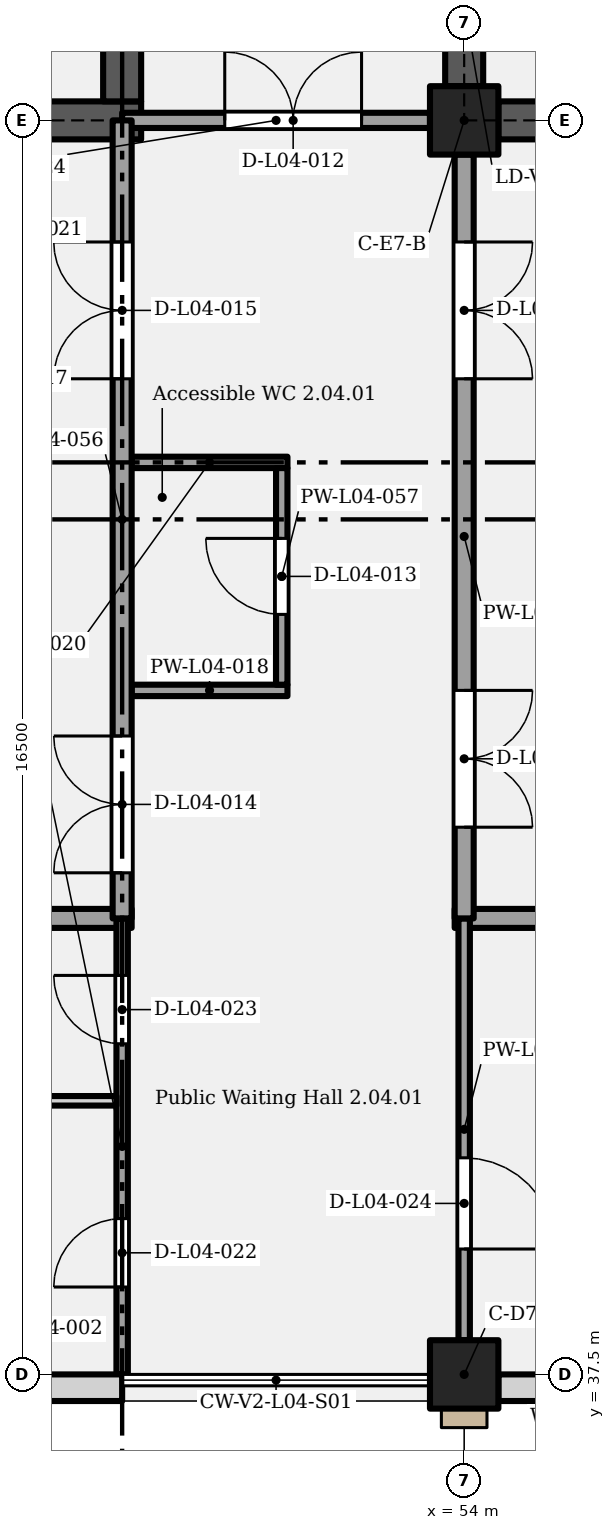
"""IFC4 building model, lengths in metres.
Left out: names, types, materials, properties, quantities, classifications, styles, units other than length and angle.
Written with IfcOpenShell. Run it as: python <this file> out.ifc"""

import sys

from ifc_helpers import new_model, si_unit, direction, frame, frame_2d, origin, origin_2d, place, context, subcontext, project, spatial, rectangle, extrude, element, fill, save


model = new_model("IFC4")
c1 = context("Model", 3, precision=1e-05, world=origin(), true_north=direction((0.0, 1.0)))
c2 = subcontext(c1, "Body", "Model", "MODEL_VIEW")
j1 = project(units=[si_unit("LENGTHUNIT", "METRE"), si_unit("PLANEANGLEUNIT", "RADIAN")], contexts=[c1])
p1 = place(None, origin())
s1 = spatial("IfcSite", under=j1, at=p1, CompositionType="ELEMENT")
p2 = place(p1, origin())
s2 = spatial("IfcBuilding", under=s1, at=p2, CompositionType="ELEMENT")
p3 = place(p2, frame((0.0, 0.0, 22.8)))
s3 = spatial("IfcBuildingStorey", under=s2, at=p3, CompositionType="ELEMENT", Elevation=22.8)
for number, where, z_axis, x_axis in (
    (1, (54.0, 37.5, 0.0), (0.0, 0.0, 1.0), (1.0, 0.0, 0.0)),
    (2, (54.0, 54.0, 0.0), (0.0, 0.0, 1.0), (1.0, 0.0, 0.0)),
):
    element("IfcColumn", number, at=place(p3, frame(where, z_axis=z_axis, x_axis=x_axis)), inside=s3, PredefinedType="COLUMN", context=c2, shape_type="SweptSolid", body=[
        extrude(rectangle(XDim=0.9, YDim=0.9, at=origin_2d()), origin(), (0.0, 0.0, 1.0), 5.4),
    ])
p4 = place(p3, frame((46.25, 54.0, 0.0), z_axis=(0.0, 0.0, 1.0), x_axis=(1.0, 0.0, 0.0)))
e3 = element("IfcWall", 3, at=p4, inside=s3, PredefinedType="SHEAR", context=c2, shape_type="SweptSolid", body=[
    extrude(rectangle(XDim=3.5, YDim=0.5, at=frame_2d((1.75, 0.0))), origin(), (0.0, 0.0, 1.0), 5.15),
])
p5 = place(p3, frame((54.45, 54.0, 0.0), z_axis=(0.0, 0.0, 1.0), x_axis=(1.0, 0.0, 0.0)))
e4 = element("IfcWall", 4, at=p5, inside=s3, PredefinedType="SHEAR", context=c2, shape_type="SweptSolid", body=[
    extrude(rectangle(XDim=2.8, YDim=0.5, at=frame_2d((1.4, 0.0))), origin(), (0.0, 0.0, 1.0), 5.15),
])
p6 = place(p3, frame((49.5, 54.25, 0.0), z_axis=(0.0, 0.0, 1.0), x_axis=(0.0, 1.0, 0.0)))
e5 = element("IfcWall", 5, at=p6, inside=s3, PredefinedType="SHEAR", context=c2, shape_type="SweptSolid", body=[
    extrude(rectangle(XDim=11.5, YDim=0.5, at=frame_2d((5.75, 0.0))), origin(), (0.0, 0.0, 1.0), 5.15),
])
p7 = place(p6, frame((0.7, 0.0, 0.0)))
e6 = element("IfcOpeningElement", 6, at=p7, cuts=e5, PredefinedType="OPENING", context=c2, shape_type="SweptSolid", body=[
    extrude(rectangle(XDim=1.1, YDim=2.1, at=frame_2d((0.55, 1.05))), frame((0.0, 0.26, 0.0), z_axis=(0.0, -1.0, 0.0), x_axis=(1.0, 0.0, 0.0)), (0.0, 0.0, 1.0), 0.52),
])
p8 = place(p6, frame((4.35, 0.0, 0.0), z_axis=(0.0, 0.0, 1.0), x_axis=(-1.0, 0.0, 0.0)))
e7 = element("IfcOpeningElement", 7, at=p8, cuts=e5, PredefinedType="OPENING", context=c2, shape_type="SweptSolid", body=[
    extrude(rectangle(XDim=1.2, YDim=2.1, at=frame_2d((0.6, 1.05))), frame((0.0, 0.26, 0.0), z_axis=(0.0, -1.0, 0.0), x_axis=(1.0, 0.0, 0.0)), (0.0, 0.0, 1.0), 0.52),
])
p9 = place(p3, frame((54.0, 54.45, 0.0), z_axis=(0.0, 0.0, 1.0), x_axis=(0.0, 1.0, 0.0)))
e8 = element("IfcWall", 8, at=p9, inside=s3, PredefinedType="SHEAR", context=c2, shape_type="SweptSolid", body=[
    extrude(rectangle(XDim=11.1, YDim=0.5, at=frame_2d((5.55, 0.0))), origin(), (0.0, 0.0, 1.0), 5.15),
])
p10 = place(p9, frame((0.5, 0.0, 0.0)))
e9 = element("IfcOpeningElement", 9, at=p10, cuts=e8, PredefinedType="OPENING", context=c2, shape_type="SweptSolid", body=[
    extrude(rectangle(XDim=1.1, YDim=2.1, at=frame_2d((0.55, 1.05))), frame((0.0, 0.26, 0.0), z_axis=(0.0, -1.0, 0.0), x_axis=(1.0, 0.0, 0.0)), (0.0, 0.0, 1.0), 0.52),
])
p11 = place(p9, frame((2.95, 0.0, 0.0)))
e10 = element("IfcOpeningElement", 10, at=p11, cuts=e8, PredefinedType="OPENING", context=c2, shape_type="SweptSolid", body=[
    extrude(rectangle(XDim=1.2, YDim=2.1, at=frame_2d((0.6, 1.05))), frame((0.0, 0.26, 0.0), z_axis=(0.0, -1.0, 0.0), x_axis=(1.0, 0.0, 0.0)), (0.0, 0.0, 1.0), 0.52),
])
p12 = place(p3, frame((45.45, 37.325, 0.0), z_axis=(0.0, 0.0, 1.0), x_axis=(1.0, 0.0, 0.0)))
e11 = element("IfcWall", 11, at=p12, inside=s3, PredefinedType="SOLIDWALL", context=c2, shape_type="SweptSolid", body=[
    extrude(rectangle(XDim=4.05, YDim=0.35, at=frame_2d((2.025, 0.0))), origin(), (0.0, 0.0, 1.0), 5.15),
])
p13 = place(p12, frame((1.05, 0.0, 1.05)))
e12 = element("IfcOpeningElement", 12, at=p13, cuts=e11, PredefinedType="OPENING", context=c2, shape_type="SweptSolid", body=[
    extrude(rectangle(XDim=1.5, YDim=3.5, at=frame_2d((0.75, 1.75))), frame((0.0, 0.185, 0.0), z_axis=(0.0, -1.0, 0.0), x_axis=(1.0, 0.0, 0.0)), (0.0, 0.0, 1.0), 0.37),
])
p14 = place(p3, frame((54.45, 37.325, 0.0), z_axis=(0.0, 0.0, 1.0), x_axis=(1.0, 0.0, 0.0)))
e13 = element("IfcWall", 13, at=p14, inside=s3, PredefinedType="SOLIDWALL", context=c2, shape_type="SweptSolid", body=[
    extrude(rectangle(XDim=8.1, YDim=0.35, at=frame_2d((4.05, 0.0))), origin(), (0.0, 0.0, 1.0), 5.15),
])
p15 = place(p14, frame((0.525, 0.0, 1.05)))
e14 = element("IfcOpeningElement", 14, at=p15, cuts=e13, PredefinedType="OPENING", context=c2, shape_type="SweptSolid", body=[
    extrude(rectangle(XDim=1.05, YDim=2.4, at=frame_2d((0.525, 1.2))), frame((0.0, 0.185, 0.0), z_axis=(0.0, -1.0, 0.0), x_axis=(1.0, 0.0, 0.0)), (0.0, 0.0, 1.0), 0.37),
])
p16 = place(p14, frame((3.525, 0.0, 1.05)))
e15 = element("IfcOpeningElement", 15, at=p16, cuts=e13, PredefinedType="OPENING", context=c2, shape_type="SweptSolid", body=[
    extrude(rectangle(XDim=1.05, YDim=2.4, at=frame_2d((0.525, 1.2))), frame((0.0, 0.185, 0.0), z_axis=(0.0, -1.0, 0.0), x_axis=(1.0, 0.0, 0.0)), (0.0, 0.0, 1.0), 0.37),
])
p17 = place(p14, frame((6.525, 0.0, 1.05)))
e16 = element("IfcOpeningElement", 16, at=p17, cuts=e13, PredefinedType="OPENING", context=c2, shape_type="SweptSolid", body=[
    extrude(rectangle(XDim=1.05, YDim=2.4, at=frame_2d((0.525, 1.2))), frame((0.0, 0.185, 0.0), z_axis=(0.0, -1.0, 0.0), x_axis=(1.0, 0.0, 0.0)), (0.0, 0.0, 1.0), 0.37),
])
p18 = place(p3, frame((45.15, 41.1, 0.0), z_axis=(0.0, 0.0, 1.0), x_axis=(1.0, 0.0, 0.0)))
e17 = element("IfcWall", 17, at=p18, inside=s3, PredefinedType="PARTITIONING", context=c2, shape_type="SweptSolid", body=[
    extrude(rectangle(XDim=4.275, YDim=0.125, at=frame_2d((2.138, 0.0))), origin(), (0.0, 0.0, 1.0), 5.15),
])
p19 = place(p3, frame((45.0, 43.5, 0.0), z_axis=(0.0, 0.0, 1.0), x_axis=(1.0, 0.0, 0.0)))
e18 = element("IfcWall", 18, at=p19, inside=s3, PredefinedType="PARTITIONING", context=c2, shape_type="SweptSolid", body=[
    extrude(rectangle(XDim=4.625, YDim=0.25, at=frame_2d((2.312, 0.0))), origin(), (0.0, 0.0, 1.0), 5.15),
])
p20 = place(p3, frame((53.875, 43.5, 0.0), z_axis=(0.0, 0.0, 1.0), x_axis=(1.0, 0.0, 0.0)))
e19 = element("IfcWall", 19, at=p20, inside=s3, PredefinedType="PARTITIONING", context=c2, shape_type="SweptSolid", body=[
    extrude(rectangle(XDim=9.125, YDim=0.25, at=frame_2d((4.562, 0.0))), origin(), (0.0, 0.0, 1.0), 5.15),
])
for number, where, z_axis, x_axis in (
    (20, (49.625, 46.5, 0.0), (0.0, 0.0, 1.0), (1.0, 0.0, 0.0)),
    (21, (49.625, 49.5, 0.0), (0.0, 0.0, 1.0), (1.0, 0.0, 0.0)),
):
    element("IfcWall", number, at=place(p3, frame(where, z_axis=z_axis, x_axis=x_axis)), inside=s3, PredefinedType="PARTITIONING", context=c2, shape_type="SweptSolid", body=[
        extrude(rectangle(XDim=2.05, YDim=0.15, at=frame_2d((1.025, 0.0))), origin(), (0.0, 0.0, 1.0), 5.15),
    ])
p21 = place(p3, frame((49.5, 54.0, 0.0), z_axis=(0.0, 0.0, 1.0), x_axis=(1.0, 0.0, 0.0)))
e22 = element("IfcWall", 22, at=p21, inside=s3, PredefinedType="PARTITIONING", context=c2, shape_type="SweptSolid", body=[
    extrude(rectangle(XDim=4.05, YDim=0.2, at=frame_2d((2.025, 0.0))), origin(), (0.0, 0.0, 1.0), 4.4),
])
p22 = place(p21, frame((1.35, 0.0, 0.0)))
e23 = element("IfcOpeningElement", 23, at=p22, cuts=e22, PredefinedType="OPENING", context=c2, shape_type="SweptSolid", body=[
    extrude(rectangle(XDim=1.8, YDim=2.1, at=frame_2d((0.9, 1.05))), frame((0.0, 0.11, 0.0), z_axis=(0.0, -1.0, 0.0), x_axis=(1.0, 0.0, 0.0)), (0.0, 0.0, 1.0), 0.22),
])
p23 = place(p3, frame((49.5, 37.5, 0.0), z_axis=(0.0, 0.0, 1.0), x_axis=(0.0, 1.0, 0.0)))
e24 = element("IfcWall", 24, at=p23, inside=s3, PredefinedType="PARTITIONING", context=c2, shape_type="SweptSolid", body=[
    extrude(rectangle(XDim=6.0, YDim=0.15, at=frame_2d((3.0, 0.0))), origin(), (0.0, 0.0, 1.0), 5.15),
])
p24 = place(p23, frame((1.15, 0.0, 0.0)))
e25 = element("IfcOpeningElement", 25, at=p24, cuts=e24, PredefinedType="OPENING", context=c2, shape_type="SweptSolid", body=[
    extrude(rectangle(XDim=0.9, YDim=2.1, at=frame_2d((0.45, 1.05))), frame((0.0, 0.085, 0.0), z_axis=(0.0, -1.0, 0.0), x_axis=(1.0, 0.0, 0.0)), (0.0, 0.0, 1.0), 0.17),
])
p25 = place(p23, frame((4.35, 0.0, 0.0)))
e26 = element("IfcOpeningElement", 26, at=p25, cuts=e24, PredefinedType="OPENING", context=c2, shape_type="SweptSolid", body=[
    extrude(rectangle(XDim=0.9, YDim=2.1, at=frame_2d((0.45, 1.05))), frame((0.0, 0.085, 0.0), z_axis=(0.0, -1.0, 0.0), x_axis=(1.0, 0.0, 0.0)), (0.0, 0.0, 1.0), 0.17),
])
p26 = place(p3, frame((49.5, 43.5, 0.0), z_axis=(0.0, 0.0, 1.0), x_axis=(0.0, 1.0, 0.0)))
e27 = element("IfcWall", 27, at=p26, inside=s3, PredefinedType="PARTITIONING", context=c2, shape_type="SweptSolid", body=[
    extrude(rectangle(XDim=10.5, YDim=0.25, at=frame_2d((5.25, 0.0))), origin(), (0.0, 0.0, 1.0), 5.15),
])
p27 = place(p26, frame((0.6, 0.0, 0.0)))
e28 = element("IfcOpeningElement", 28, at=p27, cuts=e27, PredefinedType="OPENING", context=c2, shape_type="SweptSolid", body=[
    extrude(rectangle(XDim=1.8, YDim=2.4, at=frame_2d((0.9, 1.2))), frame((0.0, 0.135, 0.0), z_axis=(0.0, -1.0, 0.0), x_axis=(1.0, 0.0, 0.0)), (0.0, 0.0, 1.0), 0.27),
])
p28 = place(p26, frame((7.1, 0.0, 0.0)))
e29 = element("IfcOpeningElement", 29, at=p28, cuts=e27, PredefinedType="OPENING", context=c2, shape_type="SweptSolid", body=[
    extrude(rectangle(XDim=1.8, YDim=2.4, at=frame_2d((0.9, 1.2))), frame((0.0, 0.135, 0.0), z_axis=(0.0, -1.0, 0.0), x_axis=(1.0, 0.0, 0.0)), (0.0, 0.0, 1.0), 0.27),
])
p29 = place(p3, frame((51.6, 46.575, 0.0), z_axis=(0.0, 0.0, 1.0), x_axis=(0.0, 1.0, 0.0)))
e30 = element("IfcWall", 30, at=p29, inside=s3, PredefinedType="PARTITIONING", context=c2, shape_type="SweptSolid", body=[
    extrude(rectangle(XDim=2.85, YDim=0.15, at=frame_2d((1.425, 0.0))), origin(), (0.0, 0.0, 1.0), 5.15),
])
p30 = place(p29, frame((0.925, 0.0, 0.0)))
e31 = element("IfcOpeningElement", 31, at=p30, cuts=e30, PredefinedType="OPENING", context=c2, shape_type="SweptSolid", body=[
    extrude(rectangle(XDim=1.0, YDim=2.1, at=frame_2d((0.5, 1.05))), frame((0.0, 0.085, 0.0), z_axis=(0.0, -1.0, 0.0), x_axis=(1.0, 0.0, 0.0)), (0.0, 0.0, 1.0), 0.17),
])
p31 = place(p3, frame((54.0, 37.95, 0.0), z_axis=(0.0, 0.0, 1.0), x_axis=(0.0, 1.0, 0.0)))
e32 = element("IfcWall", 32, at=p31, inside=s3, PredefinedType="PARTITIONING", context=c2, shape_type="SweptSolid", body=[
    extrude(rectangle(XDim=5.55, YDim=0.15, at=frame_2d((2.775, 0.0))), origin(), (0.0, 0.0, 1.0), 4.2),
])
p32 = place(p31, frame((2.4, 0.0, 0.0), z_axis=(0.0, 0.0, 1.0), x_axis=(-1.0, 0.0, 0.0)))
e33 = element("IfcOpeningElement", 33, at=p32, cuts=e32, PredefinedType="OPENING", context=c2, shape_type="SweptSolid", body=[
    extrude(rectangle(XDim=1.2, YDim=2.1, at=frame_2d((0.6, 1.05))), frame((0.0, 0.085, 0.0), z_axis=(0.0, -1.0, 0.0), x_axis=(1.0, 0.0, 0.0)), (0.0, 0.0, 1.0), 0.17),
])
p33 = place(p3, frame((54.0, 43.5, 0.0), z_axis=(0.0, 0.0, 1.0), x_axis=(0.0, 1.0, 0.0)))
e34 = element("IfcWall", 34, at=p33, inside=s3, PredefinedType="PARTITIONING", context=c2, shape_type="SweptSolid", body=[
    extrude(rectangle(XDim=10.05, YDim=0.25, at=frame_2d((5.025, 0.0))), origin(), (0.0, 0.0, 1.0), 4.2),
])
p34 = place(p33, frame((3.0, 0.0, 0.0), z_axis=(0.0, 0.0, 1.0), x_axis=(-1.0, 0.0, 0.0)))
e35 = element("IfcOpeningElement", 35, at=p34, cuts=e34, PredefinedType="OPENING", context=c2, shape_type="SweptSolid", body=[
    extrude(rectangle(XDim=1.8, YDim=2.4, at=frame_2d((0.9, 1.2))), frame((0.0, 0.135, 0.0), z_axis=(0.0, -1.0, 0.0), x_axis=(1.0, 0.0, 0.0)), (0.0, 0.0, 1.0), 0.27),
])
p35 = place(p33, frame((8.9, 0.0, 0.0), z_axis=(0.0, 0.0, 1.0), x_axis=(-1.0, 0.0, 0.0)))
e36 = element("IfcOpeningElement", 36, at=p35, cuts=e34, PredefinedType="OPENING", context=c2, shape_type="SweptSolid", body=[
    extrude(rectangle(XDim=1.8, YDim=2.4, at=frame_2d((0.9, 1.2))), frame((0.0, 0.135, 0.0), z_axis=(0.0, -1.0, 0.0), x_axis=(1.0, 0.0, 0.0)), (0.0, 0.0, 1.0), 0.27),
])
p36 = place(p22, origin())
e37 = element("IfcDoor", 37, at=p36, inside=s3, OperationType="DOUBLE_DOOR_SINGLE_SWING", PredefinedType="DOOR", context=c2, shape_type="SweptSolid", body=[
    extrude(rectangle(XDim=1.8, YDim=2.1, at=frame_2d((0.9, 1.05))), frame((0.0, 0.025, 0.0), z_axis=(0.0, -1.0, 0.0), x_axis=(1.0, 0.0, 0.0)), (0.0, 0.0, 1.0), 0.05),
])
fill(e23, e37)
p37 = place(p30, origin())
e38 = element("IfcDoor", 38, at=p37, inside=s3, OperationType="SINGLE_SWING_RIGHT", PredefinedType="DOOR", context=c2, shape_type="SweptSolid", body=[
    extrude(rectangle(XDim=1.0, YDim=2.1, at=frame_2d((0.5, 1.05))), frame((0.0, 0.025, 0.0), z_axis=(0.0, -1.0, 0.0), x_axis=(1.0, 0.0, 0.0)), (0.0, 0.0, 1.0), 0.05),
])
fill(e31, e38)
p38 = place(p27, origin())
e39 = element("IfcDoor", 39, at=p38, inside=s3, OperationType="DOUBLE_DOOR_SINGLE_SWING", PredefinedType="DOOR", context=c2, shape_type="SweptSolid", body=[
    extrude(rectangle(XDim=1.8, YDim=2.4, at=frame_2d((0.9, 1.2))), frame((0.0, 0.025, 0.0), z_axis=(0.0, -1.0, 0.0), x_axis=(1.0, 0.0, 0.0)), (0.0, 0.0, 1.0), 0.05),
])
fill(e28, e39)
p39 = place(p28, origin())
e40 = element("IfcDoor", 40, at=p39, inside=s3, OperationType="DOUBLE_DOOR_SINGLE_SWING", PredefinedType="DOOR", context=c2, shape_type="SweptSolid", body=[
    extrude(rectangle(XDim=1.8, YDim=2.4, at=frame_2d((0.9, 1.2))), frame((0.0, 0.025, 0.0), z_axis=(0.0, -1.0, 0.0), x_axis=(1.0, 0.0, 0.0)), (0.0, 0.0, 1.0), 0.05),
])
fill(e29, e40)
p40 = place(p24, origin())
e41 = element("IfcDoor", 41, at=p40, inside=s3, OperationType="SINGLE_SWING_LEFT", PredefinedType="DOOR", context=c2, shape_type="SweptSolid", body=[
    extrude(rectangle(XDim=0.9, YDim=2.1, at=frame_2d((0.45, 1.05))), frame((0.0, 0.025, 0.0), z_axis=(0.0, -1.0, 0.0), x_axis=(1.0, 0.0, 0.0)), (0.0, 0.0, 1.0), 0.05),
])
fill(e25, e41)
p41 = place(p25, origin())
e42 = element("IfcDoor", 42, at=p41, inside=s3, OperationType="SINGLE_SWING_RIGHT", PredefinedType="DOOR", context=c2, shape_type="SweptSolid", body=[
    extrude(rectangle(XDim=0.9, YDim=2.1, at=frame_2d((0.45, 1.05))), frame((0.0, 0.025, 0.0), z_axis=(0.0, -1.0, 0.0), x_axis=(1.0, 0.0, 0.0)), (0.0, 0.0, 1.0), 0.05),
])
fill(e26, e42)
p42 = place(p32, origin())
e43 = element("IfcDoor", 43, at=p42, inside=s3, OperationType="SINGLE_SWING_RIGHT", PredefinedType="DOOR", context=c2, shape_type="SweptSolid", body=[
    extrude(rectangle(XDim=1.2, YDim=2.1, at=frame_2d((0.6, 1.05))), frame((0.0, 0.025, 0.0), z_axis=(0.0, -1.0, 0.0), x_axis=(1.0, 0.0, 0.0)), (0.0, 0.0, 1.0), 0.05),
])
fill(e33, e43)
p43 = place(p34, origin())
e44 = element("IfcDoor", 44, at=p43, inside=s3, OperationType="DOUBLE_DOOR_SINGLE_SWING", PredefinedType="DOOR", context=c2, shape_type="SweptSolid", body=[
    extrude(rectangle(XDim=1.8, YDim=2.4, at=frame_2d((0.9, 1.2))), frame((0.0, 0.025, 0.0), z_axis=(0.0, -1.0, 0.0), x_axis=(1.0, 0.0, 0.0)), (0.0, 0.0, 1.0), 0.05),
])
fill(e35, e44)
p44 = place(p35, origin())
e45 = element("IfcDoor", 45, at=p44, inside=s3, OperationType="DOUBLE_DOOR_SINGLE_SWING", PredefinedType="DOOR", context=c2, shape_type="SweptSolid", body=[
    extrude(rectangle(XDim=1.8, YDim=2.4, at=frame_2d((0.9, 1.2))), frame((0.0, 0.025, 0.0), z_axis=(0.0, -1.0, 0.0), x_axis=(1.0, 0.0, 0.0)), (0.0, 0.0, 1.0), 0.05),
])
fill(e36, e45)
save(model, sys.argv[1])
